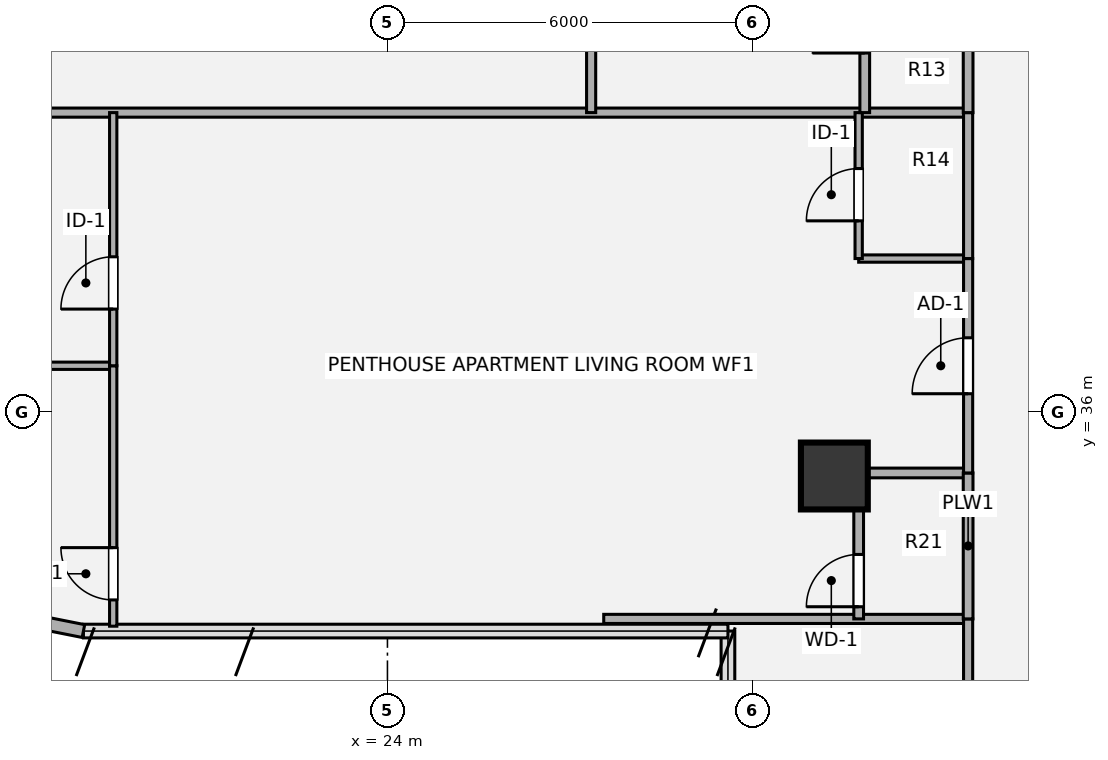
"""IFC4 building model, lengths in metres.
Left out: names, types, materials, properties, quantities, classifications, styles, units other than length and angle.
Written with IfcOpenShell. Run it as: python <this file> out.ifc"""

import sys

from ifc_helpers import new_model, si_unit, direction, frame, frame_2d, origin, origin_2d, place, context, subcontext, project, spatial, rectangle, hollow_circle, extrude, source, transform, mapped, element, fill, save


model = new_model("IFC4")
c1 = context("Model", 3, precision=1e-05, world=origin(), true_north=direction((0.0, 1.0)))
c2 = subcontext(c1, "Body", "Model", "MODEL_VIEW")
j1 = project(units=[si_unit("LENGTHUNIT", "METRE"), si_unit("PLANEANGLEUNIT", "RADIAN")], contexts=[c1])
p1 = place(None, origin())
s1 = spatial("IfcSite", under=j1, at=p1, CompositionType="ELEMENT")
p2 = place(p1, origin())
s2 = spatial("IfcBuilding", under=s1, at=p2, CompositionType="ELEMENT")
p3 = place(p2, frame((0.0, 0.0, 209.34)))
s3 = spatial("IfcBuildingStorey", under=s2, at=p3, CompositionType="ELEMENT", Elevation=209.34)
m1 = source(origin(), c2, "Body", "SweptSolid", [
    extrude(hollow_circle(Radius=0.55, WallThickness=0.04, at=origin_2d()), origin(), (0.0, 0.0, 1.0), 3.372),
])
p4 = place(p3, frame((31.35, 34.95, 0.0), z_axis=(0.0, 0.0, 1.0), x_axis=(1.0, 0.0, 0.0)))
e1 = element("IfcColumn", 1, at=p4, inside=s3, PredefinedType="COLUMN", context=c2, shape_type="MappedRepresentation", body=[
    mapped(m1, transform((0.0, 0.0, 0.0), x_axis=(1.0, 0.0, 0.0), y_axis=(0.0, 1.0, 0.0), z_axis=(0.0, 0.0, 1.0), scale=1.0)),
])
p5 = place(p3, frame((19.0, 32.4, 0.0), z_axis=(0.0, 0.0, 1.0), x_axis=(-0.980775717779, 0.195138390419, 0.0)))
e2 = element("IfcWall", 2, at=p5, inside=s3, PredefinedType="SOLIDWALL", context=c2, shape_type="SweptSolid", body=[
    extrude(rectangle(XDim=1.249, YDim=0.215, at=frame_2d((0.624, 0.0))), origin(), (0.0, 0.0, 1.0), 3.372),
])
p6 = place(p3, frame((27.557, 32.6, 0.0), z_axis=(0.0, 0.0, 1.0), x_axis=(1.0, 0.0, 0.0)))
e3 = element("IfcWall", 3, at=p6, inside=s3, PredefinedType="PARTITIONING", context=c2, shape_type="SweptSolid", body=[
    extrude(rectangle(XDim=5.993, YDim=0.15, at=frame_2d((2.997, 0.0))), origin(), (0.0, 0.0, 1.0), 3.342),
])
p7 = place(p3, frame((31.75, 35.0, 0.0), z_axis=(0.0, 0.0, 1.0), x_axis=(1.0, 0.0, 0.0)))
e4 = element("IfcWall", 4, at=p7, inside=s3, PredefinedType="PLUMBINGWALL", context=c2, shape_type="SweptSolid", body=[
    extrude(rectangle(XDim=1.8, YDim=0.16, at=frame_2d((0.9, 0.0))), origin(), (0.0, 0.0, 1.0), 1.857),
])
p8 = place(p3, frame((15.88, 36.763, 0.0), z_axis=(0.0, 0.0, 1.0), x_axis=(1.0, 0.0, 0.0)))
e5 = element("IfcWall", 5, at=p8, inside=s3, PredefinedType="PARTITIONING", context=c2, shape_type="SweptSolid", body=[
    extrude(rectangle(XDim=3.61, YDim=0.12, at=frame_2d((1.805, 0.0))), origin(), (0.0, 0.0, 1.0), 2.824),
])
p9 = place(p3, frame((31.75, 38.526, 0.0), z_axis=(0.0, 0.0, 1.0), x_axis=(1.0, 0.0, 0.0)))
e6 = element("IfcWall", 6, at=p9, inside=s3, PredefinedType="PARTITIONING", context=c2, shape_type="SweptSolid", body=[
    extrude(rectangle(XDim=1.8, YDim=0.12, at=frame_2d((0.9, 0.0))), origin(), (0.0, 0.0, 1.0), 3.101),
])
p10 = place(p3, frame((15.88, 40.926, 0.0), z_axis=(0.0, 0.0, 1.0), x_axis=(1.0, 0.0, 0.0)))
e7 = element("IfcWall", 7, at=p10, inside=s3, PredefinedType="PARTITIONING", context=c2, shape_type="SweptSolid", body=[
    extrude(rectangle(XDim=17.67, YDim=0.15, at=frame_2d((8.835, 0.0))), origin(), (0.0, 0.0, 1.0), 2.824),
])
p11 = place(p3, frame((19.49, 32.48, 0.0), z_axis=(0.0, 0.0, 1.0), x_axis=(0.0, 1.0, 0.0)))
e8 = element("IfcWall", 8, at=p11, inside=s3, PredefinedType="PARTITIONING", context=c2, shape_type="SweptSolid", body=[
    extrude(rectangle(XDim=4.283, YDim=0.12, at=frame_2d((2.142, 0.0))), origin(), (0.0, 0.0, 1.0), 3.342),
])
p12 = place(p11, frame((0.432, 0.0, 0.0)))
e9 = element("IfcOpeningElement", 9, at=p12, cuts=e8, PredefinedType="OPENING", context=c2, shape_type="SweptSolid", body=[
    extrude(rectangle(XDim=0.86, YDim=2.1, at=origin_2d()), frame((0.43, 0.07, 1.05), z_axis=(0.0, -1.0, 0.0), x_axis=(1.0, 0.0, 0.0)), (0.0, 0.0, 1.0), 0.14),
])
p13 = place(p3, frame((19.49, 36.763, 0.0), z_axis=(0.0, 0.0, 1.0), x_axis=(0.0, 1.0, 0.0)))
e10 = element("IfcWall", 10, at=p13, inside=s3, PredefinedType="PARTITIONING", context=c2, shape_type="SweptSolid", body=[
    extrude(rectangle(XDim=4.163, YDim=0.12, at=frame_2d((2.082, 0.0))), origin(), (0.0, 0.0, 1.0), 3.342),
])
p14 = place(p13, frame((0.932, 0.0, 0.0)))
e11 = element("IfcOpeningElement", 11, at=p14, cuts=e10, PredefinedType="OPENING", context=c2, shape_type="SweptSolid", body=[
    extrude(rectangle(XDim=0.86, YDim=2.1, at=origin_2d()), frame((0.43, 0.07, 1.05), z_axis=(0.0, -1.0, 0.0), x_axis=(1.0, 0.0, 0.0)), (0.0, 0.0, 1.0), 0.14),
])
p15 = place(p3, frame((27.35, 40.926, 0.0), z_axis=(0.0, 0.0, 1.0), x_axis=(0.0, 1.0, 0.0)))
e12 = element("IfcWall", 12, at=p15, inside=s3, PredefinedType="PARTITIONING", context=c2, shape_type="SweptSolid", body=[
    extrude(rectangle(XDim=5.068, YDim=0.15, at=frame_2d((2.534, 0.0))), origin(), (0.0, 0.0, 1.0), 3.342),
])
p16 = place(p15, frame((2.114, 0.0, 0.0)))
e13 = element("IfcOpeningElement", 13, at=p16, cuts=e12, PredefinedType="OPENING", context=c2, shape_type="SweptSolid", body=[
    extrude(rectangle(XDim=0.86, YDim=2.1, at=origin_2d()), frame((0.43, 0.085, 1.05), z_axis=(0.0, -1.0, 0.0), x_axis=(1.0, 0.0, 0.0)), (0.0, 0.0, 1.0), 0.17),
])
p17 = place(p3, frame((31.75, 32.6, 0.0), z_axis=(0.0, 0.0, 1.0), x_axis=(0.0, 1.0, 0.0)))
e14 = element("IfcWall", 14, at=p17, inside=s3, PredefinedType="PLUMBINGWALL", context=c2, shape_type="SweptSolid", body=[
    extrude(rectangle(XDim=2.4, YDim=0.16, at=frame_2d((1.2, 0.0))), origin(), (0.0, 0.0, 1.0), 3.342),
])
p18 = place(p17, frame((0.2, 0.0, 0.0)))
e15 = element("IfcOpeningElement", 15, at=p18, cuts=e14, PredefinedType="OPENING", context=c2, shape_type="SweptSolid", body=[
    extrude(rectangle(XDim=0.86, YDim=2.1, at=origin_2d()), frame((0.43, 0.09, 1.05), z_axis=(0.0, -1.0, 0.0), x_axis=(1.0, 0.0, 0.0)), (0.0, 0.0, 1.0), 0.18),
])
p19 = place(p3, frame((31.75, 38.526, 0.0), z_axis=(0.0, 0.0, 1.0), x_axis=(0.0, 1.0, 0.0)))
e16 = element("IfcWall", 16, at=p19, inside=s3, PredefinedType="PARTITIONING", context=c2, shape_type="SweptSolid", body=[
    extrude(rectangle(XDim=2.4, YDim=0.12, at=frame_2d((1.2, 0.0))), origin(), (0.0, 0.0, 1.0), 3.342),
])
p20 = place(p19, frame((0.62, 0.0, 0.0)))
e17 = element("IfcOpeningElement", 17, at=p20, cuts=e16, PredefinedType="OPENING", context=c2, shape_type="SweptSolid", body=[
    extrude(rectangle(XDim=0.86, YDim=2.1, at=origin_2d()), frame((0.43, 0.07, 1.05), z_axis=(0.0, -1.0, 0.0), x_axis=(1.0, 0.0, 0.0)), (0.0, 0.0, 1.0), 0.14),
])
p21 = place(p3, frame((31.85, 40.926, 0.0), z_axis=(0.0, 0.0, 1.0), x_axis=(0.0, 1.0, 0.0)))
e18 = element("IfcWall", 18, at=p21, inside=s3, PredefinedType="PLUMBINGWALL", context=c2, shape_type="SweptSolid", body=[
    extrude(rectangle(XDim=2.4, YDim=0.16, at=frame_2d((1.2, 0.0))), origin(), (0.0, 0.0, 1.0), 3.342),
])
p22 = place(p21, frame((0.98, 0.0, 0.0)))
e19 = element("IfcOpeningElement", 19, at=p22, cuts=e18, PredefinedType="OPENING", context=c2, shape_type="SweptSolid", body=[
    extrude(rectangle(XDim=0.86, YDim=2.1, at=origin_2d()), frame((0.43, 0.09, 1.05), z_axis=(0.0, -1.0, 0.0), x_axis=(1.0, 0.0, 0.0)), (0.0, 0.0, 1.0), 0.18),
])
p23 = place(p3, frame((33.55, 22.8, 0.0), z_axis=(0.0, 0.0, 1.0), x_axis=(0.0, 1.0, 0.0)))
e20 = element("IfcWall", 20, at=p23, inside=s3, PredefinedType="PARTITIONING", context=c2, shape_type="SweptSolid", body=[
    extrude(rectangle(XDim=9.8, YDim=0.15, at=frame_2d((4.9, 0.0))), origin(), (0.0, 0.0, 1.0), 3.342),
])
p24 = place(p23, frame((4.34, 0.0, 0.0)))
e21 = element("IfcOpeningElement", 21, at=p24, cuts=e20, PredefinedType="OPENING", context=c2, shape_type="SweptSolid", body=[
    extrude(rectangle(XDim=0.86, YDim=2.1, at=origin_2d()), frame((0.43, 0.085, 1.05), z_axis=(0.0, -1.0, 0.0), x_axis=(1.0, 0.0, 0.0)), (0.0, 0.0, 1.0), 0.17),
])
p25 = place(p3, frame((33.55, 32.6, 0.0), z_axis=(0.0, 0.0, 1.0), x_axis=(0.0, 1.0, 0.0)))
e22 = element("IfcWall", 22, at=p25, inside=s3, PredefinedType="PLUMBINGWALL", context=c2, shape_type="SweptSolid", body=[
    extrude(rectangle(XDim=2.4, YDim=0.16, at=frame_2d((1.2, 0.0))), origin(), (0.0, 0.0, 1.0), 3.342),
])
p26 = place(p3, frame((33.55, 35.0, 0.0), z_axis=(0.0, 0.0, 1.0), x_axis=(0.0, 1.0, 0.0)))
e23 = element("IfcWall", 23, at=p26, inside=s3, PredefinedType="PARTITIONING", context=c2, shape_type="SweptSolid", body=[
    extrude(rectangle(XDim=3.526, YDim=0.15, at=frame_2d((1.763, 0.0))), origin(), (0.0, 0.0, 1.0), 3.342),
])
p27 = place(p26, frame((1.303, 0.0, 0.0)))
e24 = element("IfcOpeningElement", 24, at=p27, cuts=e23, PredefinedType="OPENING", context=c2, shape_type="SweptSolid", body=[
    extrude(rectangle(XDim=0.92, YDim=2.1, at=origin_2d()), frame((0.46, 0.085, 1.05), z_axis=(0.0, -1.0, 0.0), x_axis=(1.0, 0.0, 0.0)), (0.0, 0.0, 1.0), 0.17),
])
p28 = place(p3, frame((33.55, 38.526, 0.0), z_axis=(0.0, 0.0, 1.0), x_axis=(0.0, 1.0, 0.0)))
e25 = element("IfcWall", 25, at=p28, inside=s3, PredefinedType="PARTITIONING", context=c2, shape_type="SweptSolid", body=[
    extrude(rectangle(XDim=2.4, YDim=0.15, at=frame_2d((1.2, 0.0))), origin(), (0.0, 0.0, 1.0), 3.342),
])
p29 = place(p3, frame((33.55, 40.926, 0.0), z_axis=(0.0, 0.0, 1.0), x_axis=(0.0, 1.0, 0.0)))
e26 = element("IfcWall", 26, at=p29, inside=s3, PredefinedType="PLUMBINGWALL", context=c2, shape_type="SweptSolid", body=[
    extrude(rectangle(XDim=2.4, YDim=0.16, at=frame_2d((1.2, 0.0))), origin(), (0.0, 0.0, 1.0), 3.342),
])
m2 = source(origin(), c2, "Body", "SweptSolid", [
    extrude(rectangle(XDim=0.86, YDim=2.1, at=origin_2d()), frame((0.43, 0.025, 1.05), z_axis=(0.0, -1.0, 0.0), x_axis=(1.0, 0.0, 0.0)), (0.0, 0.0, 1.0), 0.05),
])
p30 = place(p12, origin())
e27 = element("IfcDoor", 27, at=p30, inside=s3, OperationType="SINGLE_SWING_RIGHT", PredefinedType="DOOR", context=c2, shape_type="MappedRepresentation", body=[
    mapped(m2, transform((0.0, 0.0, 0.0), x_axis=(1.0, 0.0, 0.0), y_axis=(0.0, 1.0, 0.0), z_axis=(0.0, 0.0, 1.0), scale=1.0)),
])
fill(e9, e27)
p31 = place(p14, origin())
e28 = element("IfcDoor", 28, at=p31, inside=s3, OperationType="SINGLE_SWING_LEFT", PredefinedType="DOOR", context=c2, shape_type="MappedRepresentation", body=[
    mapped(m2, transform((0.0, 0.0, 0.0), x_axis=(1.0, 0.0, 0.0), y_axis=(0.0, 1.0, 0.0), z_axis=(0.0, 0.0, 1.0), scale=1.0)),
])
fill(e11, e28)
m3 = source(origin(), c2, "Body", "SweptSolid", [
    extrude(rectangle(XDim=0.86, YDim=2.1, at=origin_2d()), frame((0.43, 0.025, 1.05), z_axis=(0.0, -1.0, 0.0), x_axis=(1.0, 0.0, 0.0)), (0.0, 0.0, 1.0), 0.05),
])
p32 = place(p18, origin())
e29 = element("IfcDoor", 29, at=p32, inside=s3, OperationType="SINGLE_SWING_LEFT", PredefinedType="DOOR", context=c2, shape_type="MappedRepresentation", body=[
    mapped(m3, transform((0.0, 0.0, 0.0), x_axis=(1.0, 0.0, 0.0), y_axis=(0.0, 1.0, 0.0), z_axis=(0.0, 0.0, 1.0), scale=1.0)),
])
fill(e15, e29)
p33 = place(p20, origin())
e30 = element("IfcDoor", 30, at=p33, inside=s3, OperationType="SINGLE_SWING_LEFT", PredefinedType="DOOR", context=c2, shape_type="MappedRepresentation", body=[
    mapped(m2, transform((0.0, 0.0, 0.0), x_axis=(1.0, 0.0, 0.0), y_axis=(0.0, 1.0, 0.0), z_axis=(0.0, 0.0, 1.0), scale=1.0)),
])
fill(e17, e30)
p34 = place(p22, origin())
e31 = element("IfcDoor", 31, at=p34, inside=s3, OperationType="SINGLE_SWING_LEFT", PredefinedType="DOOR", context=c2, shape_type="MappedRepresentation", body=[
    mapped(m3, transform((0.0, 0.0, 0.0), x_axis=(1.0, 0.0, 0.0), y_axis=(0.0, 1.0, 0.0), z_axis=(0.0, 0.0, 1.0), scale=1.0)),
])
fill(e19, e31)
m4 = source(origin(), c2, "Body", "SweptSolid", [
    extrude(rectangle(XDim=0.92, YDim=2.1, at=origin_2d()), frame((0.46, 0.025, 1.05), z_axis=(0.0, -1.0, 0.0), x_axis=(1.0, 0.0, 0.0)), (0.0, 0.0, 1.0), 0.05),
])
p35 = place(p27, origin())
e32 = element("IfcDoor", 32, at=p35, inside=s3, OperationType="SINGLE_SWING_LEFT", PredefinedType="DOOR", context=c2, shape_type="MappedRepresentation", body=[
    mapped(m4, transform((0.0, 0.0, 0.0), x_axis=(1.0, 0.0, 0.0), y_axis=(0.0, 1.0, 0.0), z_axis=(0.0, 0.0, 1.0), scale=1.0)),
])
fill(e24, e32)
save(model, sys.argv[1])
